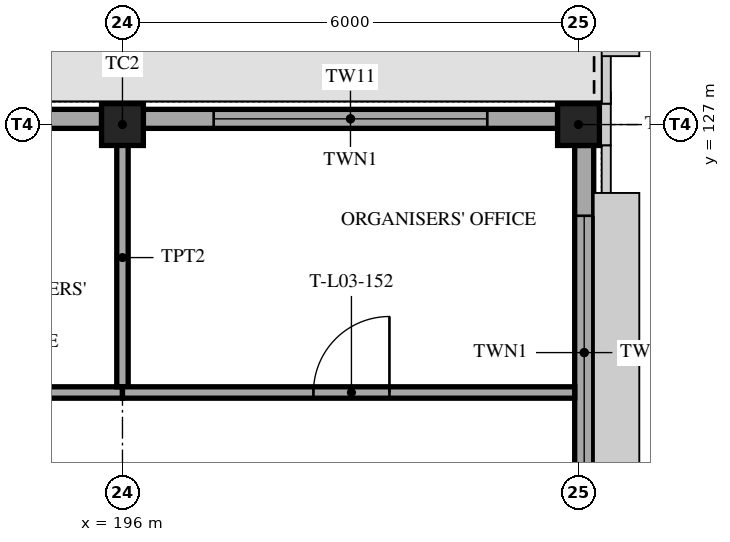
"""IFC4 building model, lengths in metres.
Left out: names, types, materials, properties, quantities, classifications, styles, units other than length and angle.
Written with IfcOpenShell. Run it as: python <this file> out.ifc"""

import sys

from ifc_helpers import new_model, si_unit, direction, frame, frame_2d, origin, origin_2d, place, context, subcontext, project, spatial, polyline, rectangle, hollow_rectangle, outline, extrude, element, fill, save


model = new_model("IFC4")
c1 = context("Model", 3, precision=1e-05, world=origin(), true_north=direction((0.0, 1.0)))
c2 = subcontext(c1, "Body", "Model", "MODEL_VIEW")
j1 = project(units=[si_unit("LENGTHUNIT", "METRE"), si_unit("PLANEANGLEUNIT", "RADIAN")], contexts=[c1])
p1 = place(None, origin())
s1 = spatial("IfcSite", under=j1, at=p1, CompositionType="ELEMENT")
p2 = place(p1, origin())
s2 = spatial("IfcBuilding", under=s1, at=p2, CompositionType="ELEMENT")
p3 = place(p2, frame((0.0, 0.0, 15.0)))
s3 = spatial("IfcBuildingStorey", under=s2, at=p3, CompositionType="ELEMENT", Elevation=15.0)
for number, where, z_axis, x_axis in (
    (1, (202.0, 127.0, 0.0), (0.0, 0.0, 1.0), (1.0, 0.0, 0.0)),
    (2, (196.0, 127.0, 0.0), (0.0, 0.0, 1.0), (1.0, 0.0, 0.0)),
):
    element("IfcColumn", number, at=place(p3, frame(where, z_axis=z_axis, x_axis=x_axis)), inside=s3, PredefinedType="COLUMN", context=c2, shape_type="SweptSolid", body=[
        extrude(hollow_rectangle(XDim=0.55, YDim=0.55, WallThickness=0.032, at=origin_2d()), origin(), (0.0, 0.0, 1.0), 4.2),
    ])
p4 = place(p3, frame((196.275, 127.075, 0.0), z_axis=(0.0, 0.0, 1.0), x_axis=(1.0, 0.0, 0.0)))
e3 = element("IfcWall", 3, at=p4, inside=s3, PredefinedType="SOLIDWALL", context=c2, shape_type="SweptSolid", body=[
    extrude(rectangle(XDim=5.45, YDim=0.25, at=frame_2d((2.725, 0.0))), origin(), (0.0, 0.0, 1.0), 3.55),
])
p5 = place(p4, frame((0.925, 0.0, 0.9)))
e4 = element("IfcOpeningElement", 4, at=p5, cuts=e3, PredefinedType="OPENING", context=c2, shape_type="SweptSolid", body=[
    extrude(rectangle(XDim=3.6, YDim=2.4, at=frame_2d((1.8, 1.2))), frame((0.0, 0.135, 0.0), z_axis=(0.0, -1.0, 0.0), x_axis=(1.0, 0.0, 0.0)), (0.0, 0.0, 1.0), 0.27),
])
p6 = place(p3, frame((202.075, 121.275, 0.0), z_axis=(0.0, 0.0, 1.0), x_axis=(0.0, 1.0, 0.0)))
e5 = element("IfcWall", 5, at=p6, inside=s3, PredefinedType="SOLIDWALL", context=c2, shape_type="SweptSolid", body=[
    extrude(rectangle(XDim=5.45, YDim=0.25, at=frame_2d((2.725, 0.0))), origin(), (0.0, 0.0, 1.0), 3.55),
])
p7 = place(p6, frame((0.925, 0.0, 0.9)))
e6 = element("IfcOpeningElement", 6, at=p7, cuts=e5, PredefinedType="OPENING", context=c2, shape_type="SweptSolid", body=[
    extrude(rectangle(XDim=3.6, YDim=2.4, at=frame_2d((1.8, 1.2))), frame((0.0, 0.135, 0.0), z_axis=(0.0, -1.0, 0.0), x_axis=(1.0, 0.0, 0.0)), (0.0, 0.0, 1.0), 0.27),
])
p8 = place(p3, frame((202.075, 127.275, 0.0), z_axis=(0.0, 0.0, 1.0), x_axis=(0.0, 1.0, 0.0)))
e7 = element("IfcWall", 7, at=p8, inside=s3, PredefinedType="SOLIDWALL", context=c2, shape_type="SweptSolid", body=[
    extrude(rectangle(XDim=5.45, YDim=0.25, at=frame_2d((2.725, 0.0))), origin(), (0.0, 0.0, 1.0), 3.55),
])
p9 = place(p8, frame((0.925, 0.0, 0.9)))
e8 = element("IfcOpeningElement", 8, at=p9, cuts=e7, PredefinedType="OPENING", context=c2, shape_type="SweptSolid", body=[
    extrude(rectangle(XDim=3.6, YDim=2.4, at=frame_2d((1.8, 1.2))), frame((0.0, 0.135, 0.0), z_axis=(0.0, -1.0, 0.0), x_axis=(1.0, 0.0, 0.0)), (0.0, 0.0, 1.0), 0.27),
])
p10 = place(p3, frame((190.275, 127.075, 0.0), z_axis=(0.0, 0.0, 1.0), x_axis=(1.0, 0.0, 0.0)))
e9 = element("IfcWall", 9, at=p10, inside=s3, PredefinedType="SOLIDWALL", context=c2, shape_type="SweptSolid", body=[
    extrude(rectangle(XDim=5.45, YDim=0.25, at=frame_2d((2.725, 0.0))), origin(), (0.0, 0.0, 1.0), 3.55),
])
p11 = place(p10, frame((1.525, 0.0, 0.0)))
e10 = element("IfcOpeningElement", 10, at=p11, cuts=e9, PredefinedType="OPENING", context=c2, shape_type="SweptSolid", body=[
    extrude(rectangle(XDim=2.4, YDim=2.1, at=frame_2d((1.2, 1.05))), frame((0.0, 0.135, 0.0), z_axis=(0.0, -1.0, 0.0), x_axis=(1.0, 0.0, 0.0)), (0.0, 0.0, 1.0), 0.27),
])
p12 = place(p3, frame((190.0, 123.475, 0.0), z_axis=(0.0, 0.0, 1.0), x_axis=(1.0, 0.0, 0.0)))
e11 = element("IfcWall", 11, at=p12, inside=s3, PredefinedType="PARTITIONING", context=c2, shape_type="SweptSolid", body=[
    extrude(rectangle(XDim=6.0, YDim=0.15, at=frame_2d((3.0, 0.0))), origin(), (0.0, 0.0, 1.0), 3.4),
])
p13 = place(p12, frame((2.5, 0.0, 0.0)))
e12 = element("IfcOpeningElement", 12, at=p13, cuts=e11, PredefinedType="OPENING", context=c2, shape_type="SweptSolid", body=[
    extrude(rectangle(XDim=1.0, YDim=2.1, at=frame_2d((0.5, 1.05))), frame((0.0, 0.085, 0.0), z_axis=(0.0, -1.0, 0.0), x_axis=(1.0, 0.0, 0.0)), (0.0, 0.0, 1.0), 0.17),
])
p14 = place(p3, frame((196.0, 123.55, 0.0), z_axis=(0.0, 0.0, 1.0), x_axis=(0.0, 1.0, 0.0)))
e13 = element("IfcWall", 13, at=p14, inside=s3, PredefinedType="PARTITIONING", context=c2, shape_type="SweptSolid", body=[
    extrude(rectangle(XDim=3.4, YDim=0.15, at=frame_2d((1.7, 0.0))), origin(), (0.0, 0.0, 1.0), 3.4),
])
p15 = place(p3, frame((196.0, 123.475, 0.0), z_axis=(0.0, 0.0, 1.0), x_axis=(1.0, 0.0, 0.0)))
e14 = element("IfcWall", 14, at=p15, inside=s3, PredefinedType="PARTITIONING", context=c2, shape_type="SweptSolid", body=[
    extrude(rectangle(XDim=5.95, YDim=0.15, at=frame_2d((2.975, 0.0))), origin(), (0.0, 0.0, 1.0), 3.4),
])
p16 = place(p15, frame((2.512, 0.0, 0.0)))
e15 = element("IfcOpeningElement", 15, at=p16, cuts=e14, PredefinedType="OPENING", context=c2, shape_type="SweptSolid", body=[
    extrude(rectangle(XDim=1.0, YDim=2.1, at=frame_2d((0.5, 1.05))), frame((0.0, 0.085, 0.0), z_axis=(0.0, -1.0, 0.0), x_axis=(1.0, 0.0, 0.0)), (0.0, 0.0, 1.0), 0.17),
])
p17 = place(p5, origin())
e16 = element("IfcWindow", 16, at=p17, inside=s3, PartitioningType="TRIPLE_PANEL_VERTICAL", PredefinedType="WINDOW", context=c2, shape_type="SweptSolid", body=[
    extrude(outline(polyline([(0.0, 0.0), (3.6, 0.0), (3.6, 2.4), (0.0, 2.4), (0.0, 0.0)]), holes=[polyline([(0.06, 0.06), (0.96, 0.06), (0.96, 2.34), (0.06, 2.34), (0.06, 0.06)]), polyline([(1.06, 0.06), (2.54, 0.06), (2.54, 2.34), (1.06, 2.34), (1.06, 0.06)]), polyline([(2.64, 0.06), (3.54, 0.06), (3.54, 2.34), (2.64, 2.34), (2.64, 0.06)])]), frame((0.0, 0.03, 0.0), z_axis=(0.0, -1.0, 0.0), x_axis=(1.0, 0.0, 0.0)), (0.0, 0.0, 1.0), 0.06),
    extrude(rectangle(XDim=0.924, YDim=2.304, at=frame_2d((0.51, 1.2))), frame((0.0, 0.01, 0.0), z_axis=(0.0, -1.0, 0.0), x_axis=(1.0, 0.0, 0.0)), (0.0, 0.0, 1.0), 0.02),
    extrude(rectangle(XDim=1.504, YDim=2.304, at=frame_2d((1.8, 1.2))), frame((0.0, 0.01, 0.0), z_axis=(0.0, -1.0, 0.0), x_axis=(1.0, 0.0, 0.0)), (0.0, 0.0, 1.0), 0.02),
    extrude(rectangle(XDim=0.924, YDim=2.304, at=frame_2d((3.09, 1.2))), frame((0.0, 0.01, 0.0), z_axis=(0.0, -1.0, 0.0), x_axis=(1.0, 0.0, 0.0)), (0.0, 0.0, 1.0), 0.02),
])
fill(e4, e16)
p18 = place(p7, origin())
e17 = element("IfcWindow", 17, at=p18, inside=s3, PartitioningType="TRIPLE_PANEL_VERTICAL", PredefinedType="WINDOW", context=c2, shape_type="SweptSolid", body=[
    extrude(outline(polyline([(0.0, 0.0), (3.6, 0.0), (3.6, 2.4), (0.0, 2.4), (0.0, 0.0)]), holes=[polyline([(0.06, 0.06), (0.96, 0.06), (0.96, 2.34), (0.06, 2.34), (0.06, 0.06)]), polyline([(1.06, 0.06), (2.54, 0.06), (2.54, 2.34), (1.06, 2.34), (1.06, 0.06)]), polyline([(2.64, 0.06), (3.54, 0.06), (3.54, 2.34), (2.64, 2.34), (2.64, 0.06)])]), frame((0.0, 0.03, 0.0), z_axis=(0.0, -1.0, 0.0), x_axis=(1.0, 0.0, 0.0)), (0.0, 0.0, 1.0), 0.06),
    extrude(rectangle(XDim=0.924, YDim=2.304, at=frame_2d((0.51, 1.2))), frame((0.0, 0.01, 0.0), z_axis=(0.0, -1.0, 0.0), x_axis=(1.0, 0.0, 0.0)), (0.0, 0.0, 1.0), 0.02),
    extrude(rectangle(XDim=1.504, YDim=2.304, at=frame_2d((1.8, 1.2))), frame((0.0, 0.01, 0.0), z_axis=(0.0, -1.0, 0.0), x_axis=(1.0, 0.0, 0.0)), (0.0, 0.0, 1.0), 0.02),
    extrude(rectangle(XDim=0.924, YDim=2.304, at=frame_2d((3.09, 1.2))), frame((0.0, 0.01, 0.0), z_axis=(0.0, -1.0, 0.0), x_axis=(1.0, 0.0, 0.0)), (0.0, 0.0, 1.0), 0.02),
])
fill(e6, e17)
p19 = place(p16, origin())
e18 = element("IfcDoor", 18, at=p19, inside=s3, OperationType="SINGLE_SWING_RIGHT", PredefinedType="DOOR", context=c2, shape_type="SweptSolid", body=[
    extrude(rectangle(XDim=1.0, YDim=2.1, at=frame_2d((0.5, 1.05))), frame((0.0, 0.025, 0.0), z_axis=(0.0, -1.0, 0.0), x_axis=(1.0, 0.0, 0.0)), (0.0, 0.0, 1.0), 0.05),
])
fill(e15, e18)
save(model, sys.argv[1])
